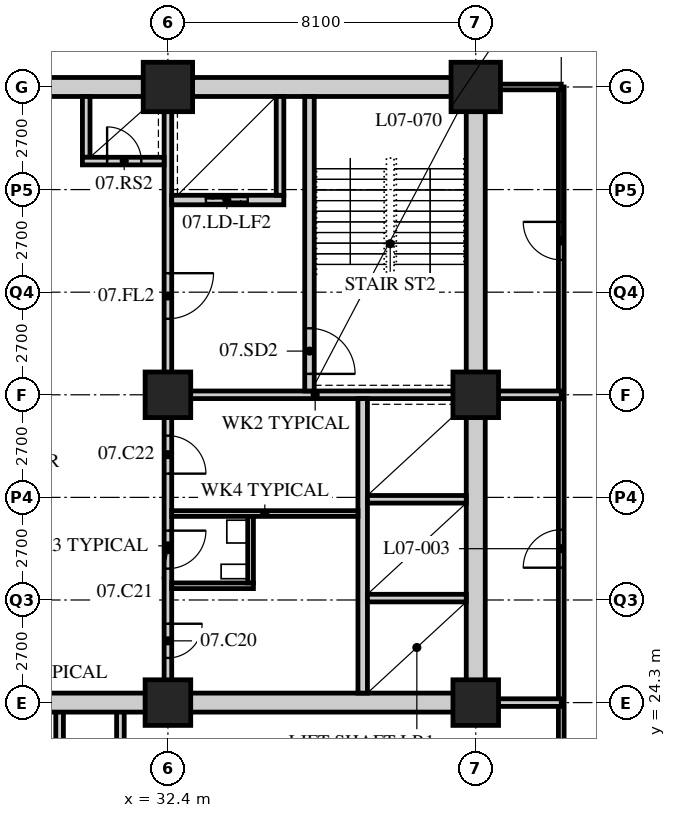
"""IFC4 building model, lengths in metres.
Left out: names, types, materials, properties, quantities, classifications, styles, units other than length and angle.
Written with IfcOpenShell. Run it as: python <this file> out.ifc"""

import sys

from ifc_helpers import new_model, si_unit, direction, frame, frame_2d, origin, origin_2d, place, context, subcontext, project, spatial, rectangle, hollow_rectangle, extrude, element, fill, save


model = new_model("IFC4")
c1 = context("Model", 3, precision=1e-05, world=origin(), true_north=direction((0.0, 1.0)))
c2 = subcontext(c1, "Body", "Model", "MODEL_VIEW")
j1 = project(units=[si_unit("LENGTHUNIT", "METRE"), si_unit("PLANEANGLEUNIT", "RADIAN")], contexts=[c1])
p1 = place(None, origin())
s1 = spatial("IfcSite", under=j1, at=p1, CompositionType="ELEMENT")
p2 = place(p1, origin())
s2 = spatial("IfcBuilding", under=s1, at=p2, CompositionType="ELEMENT")
p3 = place(p2, frame((0.0, 0.0, 36.4)))
s3 = spatial("IfcBuildingStorey", under=s2, at=p3, CompositionType="ELEMENT", Elevation=36.4)
for number, where, z_axis, x_axis in (
    (1, (32.4, 24.3, 0.0), (0.0, 0.0, 1.0), (1.0, 0.0, 0.0)),
    (2, (32.4, 32.4, 0.0), (0.0, 0.0, 1.0), (1.0, 0.0, 0.0)),
):
    element("IfcColumn", number, at=place(p3, frame(where, z_axis=z_axis, x_axis=x_axis)), inside=s3, PredefinedType="COLUMN", context=c2, shape_type="SweptSolid", body=[
        extrude(hollow_rectangle(XDim=1.2, YDim=1.2, WallThickness=0.12, at=origin_2d()), origin(), (0.0, 0.0, 1.0), 3.4),
    ])
p4 = place(p3, frame((32.4, 40.5, 0.0), z_axis=(0.0, 0.0, 1.0), x_axis=(1.0, 0.0, 0.0)))
e3 = element("IfcColumn", 3, at=p4, inside=s3, PredefinedType="COLUMN", context=c2, shape_type="SweptSolid", body=[
    extrude(hollow_rectangle(XDim=1.3, YDim=1.3, WallThickness=0.13, at=origin_2d()), origin(), (0.0, 0.0, 1.0), 3.4),
])
for number, where, z_axis, x_axis in (
    (4, (40.5, 24.3, 0.0), (0.0, 0.0, 1.0), (1.0, 0.0, 0.0)),
    (5, (40.5, 32.4, 0.0), (0.0, 0.0, 1.0), (1.0, 0.0, 0.0)),
):
    element("IfcColumn", number, at=place(p3, frame(where, z_axis=z_axis, x_axis=x_axis)), inside=s3, PredefinedType="COLUMN", context=c2, shape_type="SweptSolid", body=[
        extrude(hollow_rectangle(XDim=1.2, YDim=1.2, WallThickness=0.12, at=origin_2d()), origin(), (0.0, 0.0, 1.0), 3.4),
    ])
p5 = place(p3, frame((40.5, 40.5, 0.0), z_axis=(0.0, 0.0, 1.0), x_axis=(1.0, 0.0, 0.0)))
e6 = element("IfcColumn", 6, at=p5, inside=s3, PredefinedType="COLUMN", context=c2, shape_type="SweptSolid", body=[
    extrude(hollow_rectangle(XDim=1.3, YDim=1.3, WallThickness=0.13, at=origin_2d()), origin(), (0.0, 0.0, 1.0), 3.4),
])
p6 = place(p3, frame((42.75, 18.0, 0.0), z_axis=(0.0, 0.0, 1.0), x_axis=(0.0, 1.0, 0.0)))
e7 = element("IfcWall", 7, at=p6, inside=s3, PredefinedType="PARTITIONING", context=c2, shape_type="SweptSolid", body=[
    extrude(rectangle(XDim=22.5, YDim=0.15, at=frame_2d((11.25, 0.0))), origin(), (0.0, 0.0, 1.0), 3.19),
])
p7 = place(p6, frame((9.85, 0.0, 0.0)))
e8 = element("IfcOpeningElement", 8, at=p7, cuts=e7, PredefinedType="OPENING", context=c2, shape_type="SweptSolid", body=[
    extrude(rectangle(XDim=1.0, YDim=2.1, at=frame_2d((0.5, 1.05))), frame((0.0, 0.085, 0.0), z_axis=(0.0, -1.0, 0.0), x_axis=(1.0, 0.0, 0.0)), (0.0, 0.0, 1.0), 0.17),
])
p8 = place(p6, frame((17.95, 0.0, 0.0)))
e9 = element("IfcOpeningElement", 9, at=p8, cuts=e7, PredefinedType="OPENING", context=c2, shape_type="SweptSolid", body=[
    extrude(rectangle(XDim=1.0, YDim=2.1, at=frame_2d((0.5, 1.05))), frame((0.0, 0.085, 0.0), z_axis=(0.0, -1.0, 0.0), x_axis=(1.0, 0.0, 0.0)), (0.0, 0.0, 1.0), 0.17),
])
p9 = place(p3, frame((42.75, 40.5, 0.0), z_axis=(0.0, 0.0, 1.0), x_axis=(-1.0, 0.0, 0.0)))
e10 = element("IfcWall", 10, at=p9, inside=s3, PredefinedType="PARTITIONING", context=c2, shape_type="SweptSolid", body=[
    extrude(rectangle(XDim=2.05, YDim=0.15, at=frame_2d((1.025, 0.0))), origin(), (0.0, 0.0, 1.0), 2.578),
])
p10 = place(p3, frame((40.5, 32.4, 0.0), z_axis=(0.0, 0.0, 1.0), x_axis=(1.0, 0.0, 0.0)))
e11 = element("IfcWall", 11, at=p10, inside=s3, PredefinedType="SOLIDWALL", context=c2, shape_type="SweptSolid", body=[
    extrude(rectangle(XDim=2.25, YDim=0.2, at=frame_2d((1.125, 0.0))), origin(), (0.0, 0.0, 1.0), 2.578),
])
for number, where, z_axis, x_axis in (
    (12, (31.15, 18.0, 0.0), (0.0, 0.0, 1.0), (0.0, 1.0, 0.0)),
    (13, (29.55, 18.0, 0.0), (0.0, 0.0, 1.0), (0.0, 1.0, 0.0)),
):
    element("IfcWall", number, at=place(p3, frame(where, z_axis=z_axis, x_axis=x_axis)), inside=s3, PredefinedType="SOLIDWALL", context=c2, shape_type="SweptSolid", body=[
        extrude(rectangle(XDim=6.3, YDim=0.2, at=frame_2d((3.15, 0.0))), origin(), (0.0, 0.0, 1.0), 3.19),
    ])
p11 = place(p3, frame((40.5, 24.3, 0.0), z_axis=(0.0, 0.0, 1.0), x_axis=(1.0, 0.0, 0.0)))
e14 = element("IfcWall", 14, at=p11, inside=s3, PredefinedType="SOLIDWALL", context=c2, shape_type="SweptSolid", body=[
    extrude(rectangle(XDim=2.25, YDim=0.2, at=frame_2d((1.125, 0.0))), origin(), (0.0, 0.0, 1.0), 2.578),
])
p12 = place(p3, frame((15.95, 24.3, 0.0), z_axis=(0.0, 0.0, 1.0), x_axis=(1.0, 0.0, 0.0)))
e15 = element("IfcWall", 15, at=p12, inside=s3, PredefinedType="SOLIDWALL", context=c2, shape_type="SweptSolid", body=[
    extrude(rectangle(XDim=24.8, YDim=0.5, at=frame_2d((12.4, 0.0))), origin(), (0.0, 0.0, 1.0), 2.54),
])
p13 = place(p12, frame((11.5, 0.0, 0.0)))
e16 = element("IfcOpeningElement", 16, at=p13, cuts=e15, PredefinedType="OPENING", context=c2, shape_type="SweptSolid", body=[
    extrude(rectangle(XDim=1.8, YDim=2.4, at=frame_2d((0.9, 1.2))), frame((0.0, 0.26, 0.0), z_axis=(0.0, -1.0, 0.0), x_axis=(1.0, 0.0, 0.0)), (0.0, 0.0, 1.0), 0.52),
])
p14 = place(p3, frame((15.95, 40.5, 0.0), z_axis=(0.0, 0.0, 1.0), x_axis=(1.0, 0.0, 0.0)))
e17 = element("IfcWall", 17, at=p14, inside=s3, PredefinedType="SOLIDWALL", context=c2, shape_type="SweptSolid", body=[
    extrude(rectangle(XDim=24.8, YDim=0.5, at=frame_2d((12.4, 0.0))), origin(), (0.0, 0.0, 1.0), 2.54),
])
p15 = place(p14, frame((11.5, 0.0, 0.0)))
e18 = element("IfcOpeningElement", 18, at=p15, cuts=e17, PredefinedType="OPENING", context=c2, shape_type="SweptSolid", body=[
    extrude(rectangle(XDim=1.8, YDim=2.4, at=frame_2d((0.9, 1.2))), frame((0.0, 0.26, 0.0), z_axis=(0.0, -1.0, 0.0), x_axis=(1.0, 0.0, 0.0)), (0.0, 0.0, 1.0), 0.52),
])
p16 = place(p3, frame((40.5, 24.55, 0.0), z_axis=(0.0, 0.0, 1.0), x_axis=(0.0, 1.0, 0.0)))
e19 = element("IfcWall", 19, at=p16, inside=s3, PredefinedType="SOLIDWALL", context=c2, shape_type="SweptSolid", body=[
    extrude(rectangle(XDim=15.7, YDim=0.5, at=frame_2d((7.85, 0.0))), origin(), (0.0, 0.0, 1.0), 2.578),
])
p17 = place(p3, frame((32.3, 32.4, 0.0), z_axis=(0.0, 0.0, 1.0), x_axis=(1.0, 0.0, 0.0)))
e20 = element("IfcWall", 20, at=p17, inside=s3, PredefinedType="SOLIDWALL", context=c2, shape_type="SweptSolid", body=[
    extrude(rectangle(XDim=7.95, YDim=0.2, at=frame_2d((3.975, 0.0))), origin(), (0.0, 0.0, 1.0), 2.578),
])
p18 = place(p3, frame((32.4, 32.5, 0.0), z_axis=(0.0, 0.0, 1.0), x_axis=(0.0, 1.0, 0.0)))
e21 = element("IfcWall", 21, at=p18, inside=s3, PredefinedType="SOLIDWALL", context=c2, shape_type="SweptSolid", body=[
    extrude(rectangle(XDim=7.75, YDim=0.2, at=frame_2d((3.875, 0.0))), origin(), (0.0, 0.0, 1.0), 2.578),
])
p19 = place(p18, frame((1.9, 0.0, 0.0)))
e22 = element("IfcOpeningElement", 22, at=p19, cuts=e21, PredefinedType="OPENING", context=c2, shape_type="SweptSolid", body=[
    extrude(rectangle(XDim=1.2, YDim=2.1, at=frame_2d((0.6, 1.05))), frame((0.0, 0.11, 0.0), z_axis=(0.0, -1.0, 0.0), x_axis=(1.0, 0.0, 0.0)), (0.0, 0.0, 1.0), 0.22),
])
p20 = place(p3, frame((37.525, 24.55, 0.0), z_axis=(0.0, 0.0, 1.0), x_axis=(0.0, 1.0, 0.0)))
e23 = element("IfcWall", 23, at=p20, inside=s3, PredefinedType="SOLIDWALL", context=c2, shape_type="SweptSolid", body=[
    extrude(rectangle(XDim=7.75, YDim=0.25, at=frame_2d((3.875, 0.0))), origin(), (0.0, 0.0, 1.0), 3.19),
])
for number, where, z_axis, x_axis in (
    (24, (37.65, 27.05, 0.0), (0.0, 0.0, 1.0), (1.0, 0.0, 0.0)),
    (25, (37.65, 29.65, 0.0), (0.0, 0.0, 1.0), (1.0, 0.0, 0.0)),
):
    element("IfcWall", number, at=place(p3, frame(where, z_axis=z_axis, x_axis=x_axis)), inside=s3, PredefinedType="SOLIDWALL", context=c2, shape_type="SweptSolid", body=[
        extrude(rectangle(XDim=2.6, YDim=0.2, at=frame_2d((1.3, 0.0))), origin(), (0.0, 0.0, 1.0), 3.19),
    ])
p21 = place(p3, frame((36.125, 32.5, 0.0), z_axis=(0.0, 0.0, 1.0), x_axis=(0.0, 1.0, 0.0)))
e26 = element("IfcWall", 26, at=p21, inside=s3, PredefinedType="SOLIDWALL", context=c2, shape_type="SweptSolid", body=[
    extrude(rectangle(XDim=7.75, YDim=0.25, at=frame_2d((3.875, 0.0))), origin(), (0.0, 0.0, 1.0), 3.19),
])
p22 = place(p21, frame((0.45, 0.0, 0.0)))
e27 = element("IfcOpeningElement", 27, at=p22, cuts=e26, PredefinedType="OPENING", context=c2, shape_type="SweptSolid", body=[
    extrude(rectangle(XDim=1.2, YDim=2.1, at=frame_2d((0.6, 1.05))), frame((0.0, 0.135, 0.0), z_axis=(0.0, -1.0, 0.0), x_axis=(1.0, 0.0, 0.0)), (0.0, 0.0, 1.0), 0.27),
])
p23 = place(p3, frame((32.5, 37.525, 0.0), z_axis=(0.0, 0.0, 1.0), x_axis=(1.0, 0.0, 0.0)))
e28 = element("IfcWall", 28, at=p23, inside=s3, PredefinedType="SOLIDWALL", context=c2, shape_type="SweptSolid", body=[
    extrude(rectangle(XDim=2.95, YDim=0.25, at=frame_2d((1.475, 0.0))), origin(), (0.0, 0.0, 1.0), 3.19),
])
p24 = place(p23, frame((0.9, 0.0, 0.0)))
e29 = element("IfcOpeningElement", 29, at=p24, cuts=e28, PredefinedType="OPENING", context=c2, shape_type="SweptSolid", body=[
    extrude(rectangle(XDim=1.1, YDim=2.4, at=frame_2d((0.55, 1.2))), frame((0.0, 0.135, 0.0), z_axis=(0.0, -1.0, 0.0), x_axis=(1.0, 0.0, 0.0)), (0.0, 0.0, 1.0), 0.27),
])
p25 = place(p3, frame((35.35, 37.65, 0.0), z_axis=(0.0, 0.0, 1.0), x_axis=(0.0, 1.0, 0.0)))
e30 = element("IfcWall", 30, at=p25, inside=s3, PredefinedType="SOLIDWALL", context=c2, shape_type="SweptSolid", body=[
    extrude(rectangle(XDim=2.6, YDim=0.2, at=frame_2d((1.3, 0.0))), origin(), (0.0, 0.0, 1.0), 3.19),
])
p26 = place(p3, frame((30.25, 38.65, 0.0), z_axis=(0.0, 0.0, 1.0), x_axis=(0.0, 1.0, 0.0)))
e31 = element("IfcWall", 31, at=p26, inside=s3, PredefinedType="SOLIDWALL", context=c2, shape_type="SweptSolid", body=[
    extrude(rectangle(XDim=1.6, YDim=0.2, at=frame_2d((0.8, 0.0))), origin(), (0.0, 0.0, 1.0), 3.19),
])
p27 = place(p3, frame((30.15, 38.55, 0.0), z_axis=(0.0, 0.0, 1.0), x_axis=(1.0, 0.0, 0.0)))
e32 = element("IfcWall", 32, at=p27, inside=s3, PredefinedType="SOLIDWALL", context=c2, shape_type="SweptSolid", body=[
    extrude(rectangle(XDim=2.15, YDim=0.2, at=frame_2d((1.075, 0.0))), origin(), (0.0, 0.0, 1.0), 3.19),
])
p28 = place(p27, frame((0.65, 0.0, 0.0)))
e33 = element("IfcOpeningElement", 33, at=p28, cuts=e32, PredefinedType="OPENING", context=c2, shape_type="SweptSolid", body=[
    extrude(rectangle(XDim=0.9, YDim=2.1, at=frame_2d((0.45, 1.05))), frame((0.0, 0.11, 0.0), z_axis=(0.0, -1.0, 0.0), x_axis=(1.0, 0.0, 0.0)), (0.0, 0.0, 1.0), 0.22),
])
p29 = place(p3, frame((32.4, 24.55, 0.0), z_axis=(0.0, 0.0, 1.0), x_axis=(0.0, 1.0, 0.0)))
e34 = element("IfcWall", 34, at=p29, inside=s3, PredefinedType="PARTITIONING", context=c2, shape_type="SweptSolid", body=[
    extrude(rectangle(XDim=7.75, YDim=0.2, at=frame_2d((3.875, 0.0))), origin(), (0.0, 0.0, 1.0), 2.578),
])
p30 = place(p29, frame((0.925, 0.0, 0.0)))
e35 = element("IfcOpeningElement", 35, at=p30, cuts=e34, PredefinedType="OPENING", context=c2, shape_type="SweptSolid", body=[
    extrude(rectangle(XDim=0.9, YDim=2.1, at=frame_2d((0.45, 1.05))), frame((0.0, 0.11, 0.0), z_axis=(0.0, -1.0, 0.0), x_axis=(1.0, 0.0, 0.0)), (0.0, 0.0, 1.0), 0.22),
])
p31 = place(p29, frame((3.275, 0.0, 0.0)))
e36 = element("IfcOpeningElement", 36, at=p31, cuts=e34, PredefinedType="OPENING", context=c2, shape_type="SweptSolid", body=[
    extrude(rectangle(XDim=1.0, YDim=2.1, at=frame_2d((0.5, 1.05))), frame((0.0, 0.11, 0.0), z_axis=(0.0, -1.0, 0.0), x_axis=(1.0, 0.0, 0.0)), (0.0, 0.0, 1.0), 0.22),
])
p32 = place(p29, frame((5.775, 0.0, 0.0)))
e37 = element("IfcOpeningElement", 37, at=p32, cuts=e34, PredefinedType="OPENING", context=c2, shape_type="SweptSolid", body=[
    extrude(rectangle(XDim=1.0, YDim=2.1, at=frame_2d((0.5, 1.05))), frame((0.0, 0.11, 0.0), z_axis=(0.0, -1.0, 0.0), x_axis=(1.0, 0.0, 0.0)), (0.0, 0.0, 1.0), 0.22),
])
p33 = place(p3, frame((32.5, 27.375, 0.0), z_axis=(0.0, 0.0, 1.0), x_axis=(1.0, 0.0, 0.0)))
e38 = element("IfcWall", 38, at=p33, inside=s3, PredefinedType="PARTITIONING", context=c2, shape_type="SweptSolid", body=[
    extrude(rectangle(XDim=2.15, YDim=0.15, at=frame_2d((1.075, 0.0))), origin(), (0.0, 0.0, 1.0), 3.19),
])
p34 = place(p3, frame((32.5, 29.275, 0.0), z_axis=(0.0, 0.0, 1.0), x_axis=(1.0, 0.0, 0.0)))
e39 = element("IfcWall", 39, at=p34, inside=s3, PredefinedType="PARTITIONING", context=c2, shape_type="SweptSolid", body=[
    extrude(rectangle(XDim=4.9, YDim=0.15, at=frame_2d((2.45, 0.0))), origin(), (0.0, 0.0, 1.0), 3.19),
])
p35 = place(p3, frame((34.575, 27.45, 0.0), z_axis=(0.0, 0.0, 1.0), x_axis=(0.0, 1.0, 0.0)))
e40 = element("IfcWall", 40, at=p35, inside=s3, PredefinedType="PARTITIONING", context=c2, shape_type="SweptSolid", body=[
    extrude(rectangle(XDim=1.75, YDim=0.15, at=frame_2d((0.875, 0.0))), origin(), (0.0, 0.0, 1.0), 3.19),
])
p36 = place(p7, origin())
e41 = element("IfcDoor", 41, at=p36, inside=s3, OperationType="SINGLE_SWING_LEFT", PredefinedType="DOOR", context=c2, shape_type="SweptSolid", body=[
    extrude(rectangle(XDim=1.0, YDim=2.1, at=frame_2d((0.5, 1.05))), frame((0.0, 0.025, 0.0), z_axis=(0.0, -1.0, 0.0), x_axis=(1.0, 0.0, 0.0)), (0.0, 0.0, 1.0), 0.05),
])
fill(e8, e41)
p37 = place(p8, origin())
e42 = element("IfcDoor", 42, at=p37, inside=s3, OperationType="SINGLE_SWING_RIGHT", PredefinedType="DOOR", context=c2, shape_type="SweptSolid", body=[
    extrude(rectangle(XDim=1.0, YDim=2.1, at=frame_2d((0.5, 1.05))), frame((0.0, 0.025, 0.0), z_axis=(0.0, -1.0, 0.0), x_axis=(1.0, 0.0, 0.0)), (0.0, 0.0, 1.0), 0.05),
])
fill(e9, e42)
p38 = place(p30, origin())
e43 = element("IfcDoor", 43, at=p38, inside=s3, OperationType="SINGLE_SWING_LEFT", PredefinedType="DOOR", context=c2, shape_type="SweptSolid", body=[
    extrude(rectangle(XDim=0.9, YDim=2.1, at=frame_2d((0.45, 1.05))), frame((0.0, 0.025, 0.0), z_axis=(0.0, -1.0, 0.0), x_axis=(1.0, 0.0, 0.0)), (0.0, 0.0, 1.0), 0.05),
])
fill(e35, e43)
p39 = place(p31, origin())
e44 = element("IfcDoor", 44, at=p39, inside=s3, OperationType="SINGLE_SWING_LEFT", PredefinedType="DOOR", context=c2, shape_type="SweptSolid", body=[
    extrude(rectangle(XDim=1.0, YDim=2.1, at=frame_2d((0.5, 1.05))), frame((0.0, 0.025, 0.0), z_axis=(0.0, -1.0, 0.0), x_axis=(1.0, 0.0, 0.0)), (0.0, 0.0, 1.0), 0.05),
])
fill(e36, e44)
p40 = place(p32, origin())
e45 = element("IfcDoor", 45, at=p40, inside=s3, OperationType="SINGLE_SWING_RIGHT", PredefinedType="DOOR", context=c2, shape_type="SweptSolid", body=[
    extrude(rectangle(XDim=1.0, YDim=2.1, at=frame_2d((0.5, 1.05))), frame((0.0, 0.025, 0.0), z_axis=(0.0, -1.0, 0.0), x_axis=(1.0, 0.0, 0.0)), (0.0, 0.0, 1.0), 0.05),
])
fill(e37, e45)
p41 = place(p22, origin())
e46 = element("IfcDoor", 46, at=p41, inside=s3, OperationType="SINGLE_SWING_RIGHT", PredefinedType="DOOR", context=c2, shape_type="SweptSolid", body=[
    extrude(rectangle(XDim=1.2, YDim=2.1, at=frame_2d((0.6, 1.05))), frame((0.0, 0.025, 0.0), z_axis=(0.0, -1.0, 0.0), x_axis=(1.0, 0.0, 0.0)), (0.0, 0.0, 1.0), 0.05),
])
fill(e27, e46)
p42 = place(p19, origin())
e47 = element("IfcDoor", 47, at=p42, inside=s3, OperationType="SINGLE_SWING_LEFT", PredefinedType="DOOR", context=c2, shape_type="SweptSolid", body=[
    extrude(rectangle(XDim=1.2, YDim=2.1, at=frame_2d((0.6, 1.05))), frame((0.0, 0.025, 0.0), z_axis=(0.0, -1.0, 0.0), x_axis=(1.0, 0.0, 0.0)), (0.0, 0.0, 1.0), 0.05),
])
fill(e22, e47)
p43 = place(p28, origin())
e48 = element("IfcDoor", 48, at=p43, inside=s3, OperationType="SINGLE_SWING_LEFT", PredefinedType="DOOR", context=c2, shape_type="SweptSolid", body=[
    extrude(rectangle(XDim=0.9, YDim=2.1, at=frame_2d((0.45, 1.05))), frame((0.0, 0.025, 0.0), z_axis=(0.0, -1.0, 0.0), x_axis=(1.0, 0.0, 0.0)), (0.0, 0.0, 1.0), 0.05),
])
fill(e33, e48)
p44 = place(p24, origin())
e49 = element("IfcDoor", 49, at=p44, inside=s3, OperationType="DOUBLE_DOOR_SLIDING", PredefinedType="DOOR", context=c2, shape_type="SweptSolid", body=[
    extrude(rectangle(XDim=1.1, YDim=2.4, at=frame_2d((0.55, 1.2))), frame((0.0, 0.025, 0.0), z_axis=(0.0, -1.0, 0.0), x_axis=(1.0, 0.0, 0.0)), (0.0, 0.0, 1.0), 0.05),
])
fill(e29, e49)
save(model, sys.argv[1])
